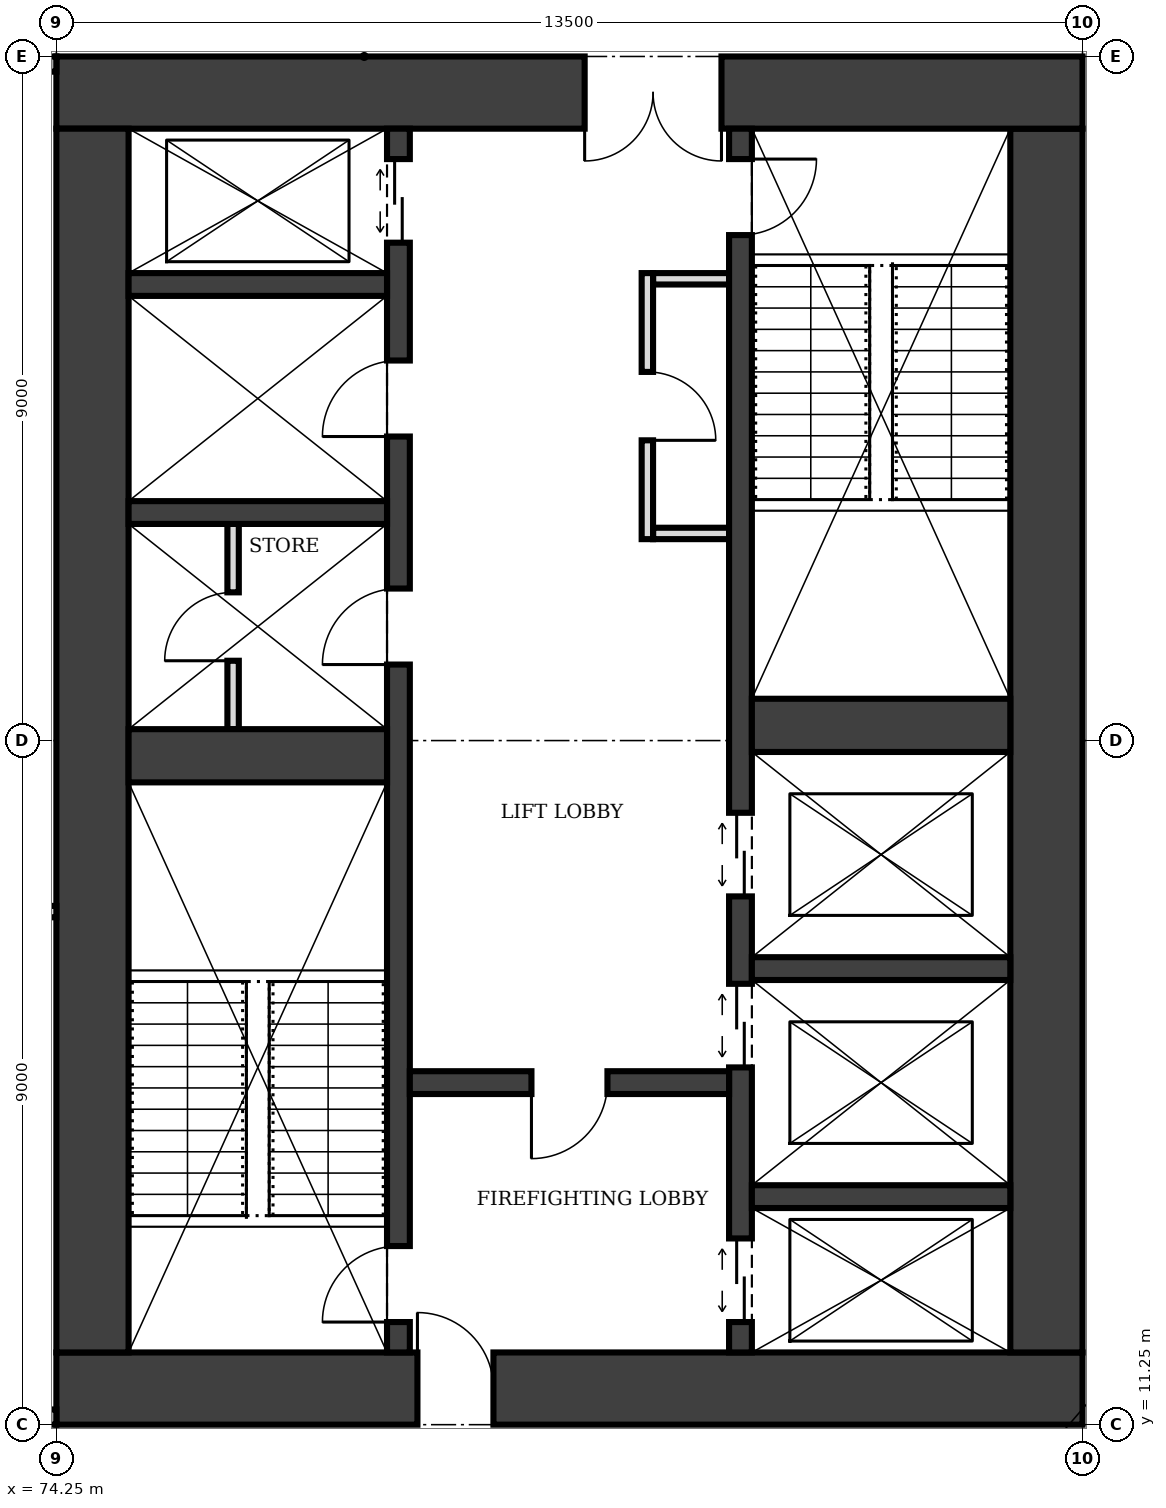
"""IFC4 building model, lengths in metres.
Left out: names, types, materials, properties, quantities, classifications, styles, units other than length and angle.
Written with IfcOpenShell. Run it as: python <this file> out.ifc"""

import sys

from ifc_helpers import new_model, si_unit, direction, frame, frame_2d, origin, place, context, subcontext, project, spatial, rectangle, extrude, element, fill, save


model = new_model("IFC4")
c1 = context("Model", 3, precision=1e-05, world=origin(), true_north=direction((0.0, 1.0)))
c2 = subcontext(c1, "Body", "Model", "MODEL_VIEW")
j1 = project(units=[si_unit("LENGTHUNIT", "METRE"), si_unit("PLANEANGLEUNIT", "RADIAN")], contexts=[c1])
p1 = place(None, origin())
s1 = spatial("IfcSite", under=j1, at=p1, CompositionType="ELEMENT")
p2 = place(p1, origin())
s2 = spatial("IfcBuilding", under=s1, at=p2, CompositionType="ELEMENT")
p3 = place(p2, frame((0.0, 0.0, 165.0)))
s3 = spatial("IfcBuildingStorey", under=s2, at=p3, CompositionType="ELEMENT", Elevation=165.0)
p4 = place(p3, frame((74.25, 11.725, 0.0), z_axis=(0.0, 0.0, 1.0), x_axis=(1.0, 0.0, 0.0)))
e1 = element("IfcWall", 1, at=p4, inside=s3, PredefinedType="SHEAR", context=c2, shape_type="SweptSolid", body=[
    extrude(rectangle(XDim=13.5, YDim=0.95, at=frame_2d((6.75, 0.0))), origin(), (0.0, 0.0, 1.0), 4.0),
])
p5 = place(p4, frame((4.75, 0.0, 0.0)))
e2 = element("IfcOpeningElement", 2, at=p5, cuts=e1, PredefinedType="OPENING", context=c2, shape_type="SweptSolid", body=[
    extrude(rectangle(XDim=1.0, YDim=2.1, at=frame_2d((0.5, 1.05))), frame((0.0, 0.485, 0.0), z_axis=(0.0, -1.0, 0.0), x_axis=(1.0, 0.0, 0.0)), (0.0, 0.0, 1.0), 0.97),
])
p6 = place(p3, frame((87.275, 12.2, 0.0), z_axis=(0.0, 0.0, 1.0), x_axis=(0.0, 1.0, 0.0)))
e3 = element("IfcWall", 3, at=p6, inside=s3, PredefinedType="SHEAR", context=c2, shape_type="SweptSolid", body=[
    extrude(rectangle(XDim=16.1, YDim=0.95, at=frame_2d((8.05, 0.0))), origin(), (0.0, 0.0, 1.0), 4.0),
])
p7 = place(p3, frame((87.75, 28.775, 0.0), z_axis=(0.0, 0.0, 1.0), x_axis=(-1.0, 0.0, 0.0)))
e4 = element("IfcWall", 4, at=p7, inside=s3, PredefinedType="SHEAR", context=c2, shape_type="SweptSolid", body=[
    extrude(rectangle(XDim=13.5, YDim=0.95, at=frame_2d((6.75, 0.0))), origin(), (0.0, 0.0, 1.0), 4.0),
])
p8 = place(p7, frame((4.75, 0.0, 0.0)))
e5 = element("IfcOpeningElement", 5, at=p8, cuts=e4, PredefinedType="OPENING", context=c2, shape_type="SweptSolid", body=[
    extrude(rectangle(XDim=1.8, YDim=2.1, at=frame_2d((0.9, 1.05))), frame((0.0, 0.485, 0.0), z_axis=(0.0, -1.0, 0.0), x_axis=(1.0, 0.0, 0.0)), (0.0, 0.0, 1.0), 0.97),
])
p9 = place(p3, frame((74.725, 28.3, 0.0), z_axis=(0.0, 0.0, 1.0), x_axis=(0.0, -1.0, 0.0)))
e6 = element("IfcWall", 6, at=p9, inside=s3, PredefinedType="SHEAR", context=c2, shape_type="SweptSolid", body=[
    extrude(rectangle(XDim=16.1, YDim=0.95, at=frame_2d((8.05, 0.0))), origin(), (0.0, 0.0, 1.0), 4.0),
])
p10 = place(p3, frame((78.75, 12.2, 0.0), z_axis=(0.0, 0.0, 1.0), x_axis=(0.0, 1.0, 0.0)))
e7 = element("IfcWall", 7, at=p10, inside=s3, PredefinedType="SHEAR", context=c2, shape_type="SweptSolid", body=[
    extrude(rectangle(XDim=16.1, YDim=0.3, at=frame_2d((8.05, 0.0))), origin(), (0.0, 0.0, 1.0), 4.0),
])
p11 = place(p10, frame((0.4, 0.0, 0.0)))
e8 = element("IfcOpeningElement", 8, at=p11, cuts=e7, PredefinedType="OPENING", context=c2, shape_type="SweptSolid", body=[
    extrude(rectangle(XDim=1.0, YDim=2.1, at=frame_2d((0.5, 1.05))), frame((0.0, 0.16, 0.0), z_axis=(0.0, -1.0, 0.0), x_axis=(1.0, 0.0, 0.0)), (0.0, 0.0, 1.0), 0.32),
])
p12 = place(p10, frame((14.6, 0.0, 0.0)))
e9 = element("IfcOpeningElement", 9, at=p12, cuts=e7, PredefinedType="OPENING", context=c2, shape_type="SweptSolid", body=[
    extrude(rectangle(XDim=1.1, YDim=2.1, at=frame_2d((0.55, 1.05))), frame((0.0, 0.16, 0.0), z_axis=(0.0, -1.0, 0.0), x_axis=(1.0, 0.0, 0.0)), (0.0, 0.0, 1.0), 0.32),
])
p13 = place(p10, frame((9.05, 0.0, 0.0)))
e10 = element("IfcOpeningElement", 10, at=p13, cuts=e7, PredefinedType="OPENING", context=c2, shape_type="SweptSolid", body=[
    extrude(rectangle(XDim=1.0, YDim=2.1, at=frame_2d((0.5, 1.05))), frame((0.0, 0.16, 0.0), z_axis=(0.0, -1.0, 0.0), x_axis=(1.0, 0.0, 0.0)), (0.0, 0.0, 1.0), 0.32),
])
p14 = place(p10, frame((12.05, 0.0, 0.0)))
e11 = element("IfcOpeningElement", 11, at=p14, cuts=e7, PredefinedType="OPENING", context=c2, shape_type="SweptSolid", body=[
    extrude(rectangle(XDim=1.0, YDim=2.1, at=frame_2d((0.5, 1.05))), frame((0.0, 0.16, 0.0), z_axis=(0.0, -1.0, 0.0), x_axis=(1.0, 0.0, 0.0)), (0.0, 0.0, 1.0), 0.32),
])
p15 = place(p3, frame((83.25, 12.2, 0.0), z_axis=(0.0, 0.0, 1.0), x_axis=(0.0, 1.0, 0.0)))
e12 = element("IfcWall", 12, at=p15, inside=s3, PredefinedType="SHEAR", context=c2, shape_type="SweptSolid", body=[
    extrude(rectangle(XDim=16.1, YDim=0.3, at=frame_2d((8.05, 0.0))), origin(), (0.0, 0.0, 1.0), 4.0),
])
p16 = place(p15, frame((14.7, 0.0, 0.0)))
e13 = element("IfcOpeningElement", 13, at=p16, cuts=e12, PredefinedType="OPENING", context=c2, shape_type="SweptSolid", body=[
    extrude(rectangle(XDim=1.0, YDim=2.1, at=frame_2d((0.5, 1.05))), frame((0.0, 0.16, 0.0), z_axis=(0.0, -1.0, 0.0), x_axis=(1.0, 0.0, 0.0)), (0.0, 0.0, 1.0), 0.32),
])
p17 = place(p15, frame((0.4, 0.0, 0.0)))
e14 = element("IfcOpeningElement", 14, at=p17, cuts=e12, PredefinedType="OPENING", context=c2, shape_type="SweptSolid", body=[
    extrude(rectangle(XDim=1.1, YDim=2.1, at=frame_2d((0.55, 1.05))), frame((0.0, 0.16, 0.0), z_axis=(0.0, -1.0, 0.0), x_axis=(1.0, 0.0, 0.0)), (0.0, 0.0, 1.0), 0.32),
])
p18 = place(p15, frame((3.75, 0.0, 0.0)))
e15 = element("IfcOpeningElement", 15, at=p18, cuts=e12, PredefinedType="OPENING", context=c2, shape_type="SweptSolid", body=[
    extrude(rectangle(XDim=1.1, YDim=2.1, at=frame_2d((0.55, 1.05))), frame((0.0, 0.16, 0.0), z_axis=(0.0, -1.0, 0.0), x_axis=(1.0, 0.0, 0.0)), (0.0, 0.0, 1.0), 0.32),
])
p19 = place(p15, frame((6.0, 0.0, 0.0)))
e16 = element("IfcOpeningElement", 16, at=p19, cuts=e12, PredefinedType="OPENING", context=c2, shape_type="SweptSolid", body=[
    extrude(rectangle(XDim=1.1, YDim=2.1, at=frame_2d((0.55, 1.05))), frame((0.0, 0.16, 0.0), z_axis=(0.0, -1.0, 0.0), x_axis=(1.0, 0.0, 0.0)), (0.0, 0.0, 1.0), 0.32),
])
p20 = place(p3, frame((75.2, 20.05, 0.0), z_axis=(0.0, 0.0, 1.0), x_axis=(1.0, 0.0, 0.0)))
e17 = element("IfcWall", 17, at=p20, inside=s3, PredefinedType="SHEAR", context=c2, shape_type="SweptSolid", body=[
    extrude(rectangle(XDim=3.4, YDim=0.7, at=frame_2d((1.7, 0.0))), origin(), (0.0, 0.0, 1.0), 4.0),
])
p21 = place(p3, frame((78.9, 15.75, 0.0), z_axis=(0.0, 0.0, 1.0), x_axis=(1.0, 0.0, 0.0)))
e18 = element("IfcWall", 18, at=p21, inside=s3, PredefinedType="SHEAR", context=c2, shape_type="SweptSolid", body=[
    extrude(rectangle(XDim=4.2, YDim=0.3, at=frame_2d((2.1, 0.0))), origin(), (0.0, 0.0, 1.0), 4.0),
])
p22 = place(p21, frame((1.6, 0.0, 0.0)))
e19 = element("IfcOpeningElement", 19, at=p22, cuts=e18, PredefinedType="OPENING", context=c2, shape_type="SweptSolid", body=[
    extrude(rectangle(XDim=1.0, YDim=2.1, at=frame_2d((0.5, 1.05))), frame((0.0, 0.16, 0.0), z_axis=(0.0, -1.0, 0.0), x_axis=(1.0, 0.0, 0.0)), (0.0, 0.0, 1.0), 0.32),
])
for number, where, z_axis, x_axis in (
    (20, (83.4, 14.25, 0.0), (0.0, 0.0, 1.0), (1.0, 0.0, 0.0)),
    (21, (83.4, 17.25, 0.0), (0.0, 0.0, 1.0), (1.0, 0.0, 0.0)),
):
    element("IfcWall", number, at=place(p3, frame(where, z_axis=z_axis, x_axis=x_axis)), inside=s3, PredefinedType="SHEAR", context=c2, shape_type="SweptSolid", body=[
        extrude(rectangle(XDim=3.4, YDim=0.3, at=frame_2d((1.7, 0.0))), origin(), (0.0, 0.0, 1.0), 4.0),
    ])
p23 = place(p3, frame((83.4, 20.45, 0.0), z_axis=(0.0, 0.0, 1.0), x_axis=(1.0, 0.0, 0.0)))
e22 = element("IfcWall", 22, at=p23, inside=s3, PredefinedType="SHEAR", context=c2, shape_type="SweptSolid", body=[
    extrude(rectangle(XDim=3.4, YDim=0.7, at=frame_2d((1.7, 0.0))), origin(), (0.0, 0.0, 1.0), 4.0),
])
for number, where, z_axis, x_axis in (
    (23, (75.2, 23.25, 0.0), (0.0, 0.0, 1.0), (1.0, 0.0, 0.0)),
    (24, (75.2, 26.25, 0.0), (0.0, 0.0, 1.0), (1.0, 0.0, 0.0)),
):
    element("IfcWall", number, at=place(p3, frame(where, z_axis=z_axis, x_axis=x_axis)), inside=s3, PredefinedType="SHEAR", context=c2, shape_type="SweptSolid", body=[
        extrude(rectangle(XDim=3.4, YDim=0.3, at=frame_2d((1.7, 0.0))), origin(), (0.0, 0.0, 1.0), 4.0),
    ])
p24 = place(p3, frame((82.025, 22.9, 0.0), z_axis=(0.0, 0.0, 1.0), x_axis=(0.0, 1.0, 0.0)))
e25 = element("IfcWall", 25, at=p24, inside=s3, PredefinedType="PARTITIONING", context=c2, shape_type="SweptSolid", body=[
    extrude(rectangle(XDim=3.5, YDim=0.15, at=frame_2d((1.75, 0.0))), origin(), (0.0, 0.0, 1.0), 3.75),
])
p25 = place(p24, frame((1.3, 0.0, 0.0)))
e26 = element("IfcOpeningElement", 26, at=p25, cuts=e25, PredefinedType="OPENING", context=c2, shape_type="SweptSolid", body=[
    extrude(rectangle(XDim=0.9, YDim=2.1, at=frame_2d((0.45, 1.05))), frame((0.0, 0.085, 0.0), z_axis=(0.0, -1.0, 0.0), x_axis=(1.0, 0.0, 0.0)), (0.0, 0.0, 1.0), 0.17),
])
for number, where, z_axis, x_axis in (
    (27, (82.1, 22.975, 0.0), (0.0, 0.0, 1.0), (1.0, 0.0, 0.0)),
    (28, (82.1, 26.325, 0.0), (0.0, 0.0, 1.0), (1.0, 0.0, 0.0)),
):
    element("IfcWall", number, at=place(p3, frame(where, z_axis=z_axis, x_axis=x_axis)), inside=s3, PredefinedType="PARTITIONING", context=c2, shape_type="SweptSolid", body=[
        extrude(rectangle(XDim=1.0, YDim=0.15, at=frame_2d((0.5, 0.0))), origin(), (0.0, 0.0, 1.0), 3.75),
    ])
p26 = place(p3, frame((76.575, 20.4, 0.0), z_axis=(0.0, 0.0, 1.0), x_axis=(0.0, 1.0, 0.0)))
e29 = element("IfcWall", 29, at=p26, inside=s3, PredefinedType="PARTITIONING", context=c2, shape_type="SweptSolid", body=[
    extrude(rectangle(XDim=2.7, YDim=0.15, at=frame_2d((1.35, 0.0))), origin(), (0.0, 0.0, 1.0), 3.75),
])
p27 = place(p26, frame((0.9, 0.0, 0.0)))
e30 = element("IfcOpeningElement", 30, at=p27, cuts=e29, PredefinedType="OPENING", context=c2, shape_type="SweptSolid", body=[
    extrude(rectangle(XDim=0.9, YDim=2.1, at=frame_2d((0.45, 1.05))), frame((0.0, 0.085, 0.0), z_axis=(0.0, -1.0, 0.0), x_axis=(1.0, 0.0, 0.0)), (0.0, 0.0, 1.0), 0.17),
])
for number, where, z_axis, x_axis in (
    (31, (68.47, 11.35, 0.0), (0.0, 0.0, 1.0), (1.0, 0.0, 0.0)),
    (32, (68.47, 29.15, 0.0), (0.0, 0.0, 1.0), (1.0, 0.0, 0.0)),
):
    element("IfcWall", number, at=place(p3, frame(where, z_axis=z_axis, x_axis=x_axis)), inside=s3, PredefinedType="SOLIDWALL", context=c2, shape_type="SweptSolid", body=[
        extrude(rectangle(XDim=5.78, YDim=0.2, at=frame_2d((2.89, 0.0))), origin(), (0.0, 0.0, 1.0), 3.75),
    ])
p28 = place(p3, frame((65.15, 18.0, 0.0), z_axis=(0.0, 0.0, 1.0), x_axis=(1.0, 0.0, 0.0)))
e33 = element("IfcWall", 33, at=p28, inside=s3, PredefinedType="PARTITIONING", context=c2, shape_type="SweptSolid", body=[
    extrude(rectangle(XDim=9.1, YDim=0.15, at=frame_2d((4.55, 0.0))), origin(), (0.0, 0.0, 1.0), 3.75),
])
p29 = place(p5, origin())
e34 = element("IfcDoor", 34, at=p29, inside=s3, OperationType="SINGLE_SWING_LEFT", PredefinedType="DOOR", context=c2, shape_type="SweptSolid", body=[
    extrude(rectangle(XDim=1.0, YDim=2.1, at=frame_2d((0.5, 1.05))), frame((0.0, 0.025, 0.0), z_axis=(0.0, -1.0, 0.0), x_axis=(1.0, 0.0, 0.0)), (0.0, 0.0, 1.0), 0.05),
])
fill(e2, e34)
p30 = place(p8, origin())
e35 = element("IfcDoor", 35, at=p30, inside=s3, OperationType="DOUBLE_DOOR_SINGLE_SWING", PredefinedType="DOOR", context=c2, shape_type="SweptSolid", body=[
    extrude(rectangle(XDim=1.8, YDim=2.1, at=frame_2d((0.9, 1.05))), frame((0.0, 0.025, 0.0), z_axis=(0.0, -1.0, 0.0), x_axis=(1.0, 0.0, 0.0)), (0.0, 0.0, 1.0), 0.05),
])
fill(e5, e35)
p31 = place(p22, frame((1.0, 0.0, 0.0), z_axis=(0.0, 0.0, 1.0), x_axis=(-1.0, 0.0, 0.0)))
e36 = element("IfcDoor", 36, at=p31, inside=s3, OperationType="SINGLE_SWING_RIGHT", PredefinedType="DOOR", context=c2, shape_type="SweptSolid", body=[
    extrude(rectangle(XDim=1.0, YDim=2.1, at=frame_2d((0.5, 1.05))), frame((0.0, 0.025, 0.0), z_axis=(0.0, -1.0, 0.0), x_axis=(1.0, 0.0, 0.0)), (0.0, 0.0, 1.0), 0.05),
])
fill(e19, e36)
p32 = place(p11, origin())
e37 = element("IfcDoor", 37, at=p32, inside=s3, OperationType="SINGLE_SWING_LEFT", PredefinedType="DOOR", context=c2, shape_type="SweptSolid", body=[
    extrude(rectangle(XDim=1.0, YDim=2.1, at=frame_2d((0.5, 1.05))), frame((0.0, 0.025, 0.0), z_axis=(0.0, -1.0, 0.0), x_axis=(1.0, 0.0, 0.0)), (0.0, 0.0, 1.0), 0.05),
])
fill(e8, e37)
p33 = place(p16, frame((1.0, 0.0, 0.0), z_axis=(0.0, 0.0, 1.0), x_axis=(-1.0, 0.0, 0.0)))
e38 = element("IfcDoor", 38, at=p33, inside=s3, OperationType="SINGLE_SWING_LEFT", PredefinedType="DOOR", context=c2, shape_type="SweptSolid", body=[
    extrude(rectangle(XDim=1.0, YDim=2.1, at=frame_2d((0.5, 1.05))), frame((0.0, 0.025, 0.0), z_axis=(0.0, -1.0, 0.0), x_axis=(1.0, 0.0, 0.0)), (0.0, 0.0, 1.0), 0.05),
])
fill(e13, e38)
p34 = place(p17, origin())
e39 = element("IfcDoor", 39, at=p34, inside=s3, OperationType="DOUBLE_DOOR_SLIDING", PredefinedType="DOOR", context=c2, shape_type="SweptSolid", body=[
    extrude(rectangle(XDim=1.1, YDim=2.1, at=frame_2d((0.55, 1.05))), frame((0.0, 0.025, 0.0), z_axis=(0.0, -1.0, 0.0), x_axis=(1.0, 0.0, 0.0)), (0.0, 0.0, 1.0), 0.05),
])
fill(e14, e39)
p35 = place(p12, origin())
e40 = element("IfcDoor", 40, at=p35, inside=s3, OperationType="DOUBLE_DOOR_SLIDING", PredefinedType="DOOR", context=c2, shape_type="SweptSolid", body=[
    extrude(rectangle(XDim=1.1, YDim=2.1, at=frame_2d((0.55, 1.05))), frame((0.0, 0.025, 0.0), z_axis=(0.0, -1.0, 0.0), x_axis=(1.0, 0.0, 0.0)), (0.0, 0.0, 1.0), 0.05),
])
fill(e9, e40)
p36 = place(p18, origin())
e41 = element("IfcDoor", 41, at=p36, inside=s3, OperationType="DOUBLE_DOOR_SLIDING", PredefinedType="DOOR", context=c2, shape_type="SweptSolid", body=[
    extrude(rectangle(XDim=1.1, YDim=2.1, at=frame_2d((0.55, 1.05))), frame((0.0, 0.025, 0.0), z_axis=(0.0, -1.0, 0.0), x_axis=(1.0, 0.0, 0.0)), (0.0, 0.0, 1.0), 0.05),
])
fill(e15, e41)
p37 = place(p19, origin())
e42 = element("IfcDoor", 42, at=p37, inside=s3, OperationType="DOUBLE_DOOR_SLIDING", PredefinedType="DOOR", context=c2, shape_type="SweptSolid", body=[
    extrude(rectangle(XDim=1.1, YDim=2.1, at=frame_2d((0.55, 1.05))), frame((0.0, 0.025, 0.0), z_axis=(0.0, -1.0, 0.0), x_axis=(1.0, 0.0, 0.0)), (0.0, 0.0, 1.0), 0.05),
])
fill(e16, e42)
p38 = place(p25, frame((0.9, 0.0, 0.0), z_axis=(0.0, 0.0, 1.0), x_axis=(-1.0, 0.0, 0.0)))
e43 = element("IfcDoor", 43, at=p38, inside=s3, OperationType="SINGLE_SWING_RIGHT", PredefinedType="DOOR", context=c2, shape_type="SweptSolid", body=[
    extrude(rectangle(XDim=0.9, YDim=2.1, at=frame_2d((0.45, 1.05))), frame((0.0, 0.025, 0.0), z_axis=(0.0, -1.0, 0.0), x_axis=(1.0, 0.0, 0.0)), (0.0, 0.0, 1.0), 0.05),
])
fill(e26, e43)
p39 = place(p13, origin())
e44 = element("IfcDoor", 44, at=p39, inside=s3, OperationType="SINGLE_SWING_LEFT", PredefinedType="DOOR", context=c2, shape_type="SweptSolid", body=[
    extrude(rectangle(XDim=1.0, YDim=2.1, at=frame_2d((0.5, 1.05))), frame((0.0, 0.025, 0.0), z_axis=(0.0, -1.0, 0.0), x_axis=(1.0, 0.0, 0.0)), (0.0, 0.0, 1.0), 0.05),
])
fill(e10, e44)
p40 = place(p27, origin())
e45 = element("IfcDoor", 45, at=p40, inside=s3, OperationType="SINGLE_SWING_LEFT", PredefinedType="DOOR", context=c2, shape_type="SweptSolid", body=[
    extrude(rectangle(XDim=0.9, YDim=2.1, at=frame_2d((0.45, 1.05))), frame((0.0, 0.025, 0.0), z_axis=(0.0, -1.0, 0.0), x_axis=(1.0, 0.0, 0.0)), (0.0, 0.0, 1.0), 0.05),
])
fill(e30, e45)
p41 = place(p14, origin())
e46 = element("IfcDoor", 46, at=p41, inside=s3, OperationType="SINGLE_SWING_LEFT", PredefinedType="DOOR", context=c2, shape_type="SweptSolid", body=[
    extrude(rectangle(XDim=1.0, YDim=2.1, at=frame_2d((0.5, 1.05))), frame((0.0, 0.025, 0.0), z_axis=(0.0, -1.0, 0.0), x_axis=(1.0, 0.0, 0.0)), (0.0, 0.0, 1.0), 0.05),
])
fill(e11, e46)
save(model, sys.argv[1])
